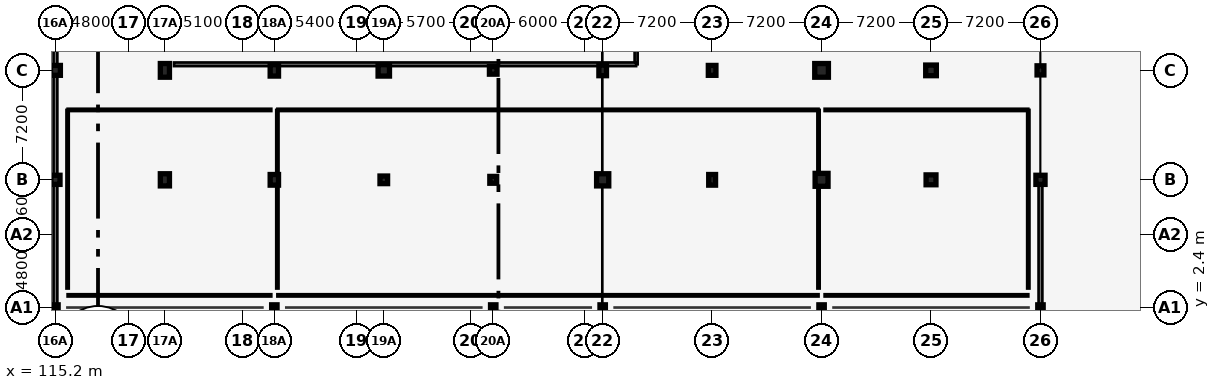
"""IFC4 building model, lengths in metres.
Left out: names, types, materials, properties, quantities, classifications, styles, units other than length and angle.
Written with IfcOpenShell. Run it as: python <this file> out.ifc"""

import sys

from ifc_helpers import new_model, si_unit, direction, frame, frame_2d, origin, origin_2d, place, context, subcontext, project, spatial, rectangle, circle, hollow_circle, extrude, element, fill, save


model = new_model("IFC4")
c1 = context("Model", 3, precision=1e-05, world=origin(), true_north=direction((0.0, 1.0)))
c2 = subcontext(c1, "Body", "Model", "MODEL_VIEW")
j1 = project(units=[si_unit("LENGTHUNIT", "METRE"), si_unit("PLANEANGLEUNIT", "RADIAN")], contexts=[c1])
p1 = place(None, origin())
s1 = spatial("IfcSite", under=j1, at=p1, CompositionType="ELEMENT")
p2 = place(p1, origin())
s2 = spatial("IfcBuilding", under=s1, at=p2, CompositionType="ELEMENT")
p3 = place(p2, frame((0.0, 0.0, 13.2)))
s3 = spatial("IfcBuildingStorey", under=s2, at=p3, CompositionType="ELEMENT", Elevation=13.2)
p4 = place(p3, frame((115.2, 10.8, 0.0), z_axis=(0.0, 0.0, 1.0), x_axis=(1.0, 0.0, 0.0)))
e1 = element("IfcColumn", 1, at=p4, inside=s3, PredefinedType="COLUMN", context=c2, shape_type="SweptSolid", body=[
    extrude(rectangle(XDim=0.6, YDim=0.6, at=origin_2d()), origin(), (0.0, 0.0, 1.0), 4.2),
])
p5 = place(p3, frame((115.2, 18.0, 0.0), z_axis=(0.0, 0.0, 1.0), x_axis=(1.0, 0.0, 0.0)))
e2 = element("IfcColumn", 2, at=p5, inside=s3, PredefinedType="COLUMN", context=c2, shape_type="SweptSolid", body=[
    extrude(rectangle(XDim=0.65, YDim=0.65, at=origin_2d()), origin(), (0.0, 0.0, 1.0), 4.2),
])
p6 = place(p3, frame((122.4, 10.8, 0.0), z_axis=(0.0, 0.0, 1.0), x_axis=(1.0, 0.0, 0.0)))
e3 = element("IfcColumn", 3, at=p6, inside=s3, PredefinedType="COLUMN", context=c2, shape_type="SweptSolid", body=[
    extrude(rectangle(XDim=0.6, YDim=0.8, at=origin_2d()), origin(), (0.0, 0.0, 1.0), 4.2),
])
p7 = place(p3, frame((122.4, 18.0, 0.0), z_axis=(0.0, 0.0, 1.0), x_axis=(1.0, 0.0, 0.0)))
e4 = element("IfcColumn", 4, at=p7, inside=s3, PredefinedType="COLUMN", context=c2, shape_type="SweptSolid", body=[
    extrude(rectangle(XDim=0.6, YDim=0.9, at=origin_2d()), origin(), (0.0, 0.0, 1.0), 4.2),
])
p8 = place(p3, frame((129.6, 10.8, 0.0), z_axis=(0.0, 0.0, 1.0), x_axis=(1.0, 0.0, 0.0)))
e5 = element("IfcColumn", 5, at=p8, inside=s3, PredefinedType="COLUMN", context=c2, shape_type="SweptSolid", body=[
    extrude(rectangle(XDim=0.55, YDim=0.7, at=origin_2d()), origin(), (0.0, 0.0, 1.0), 4.2),
])
p9 = place(p3, frame((129.6, 18.0, 0.0), z_axis=(0.0, 0.0, 1.0), x_axis=(1.0, 0.0, 0.0)))
e6 = element("IfcColumn", 6, at=p9, inside=s3, PredefinedType="COLUMN", context=c2, shape_type="SweptSolid", body=[
    extrude(rectangle(XDim=0.55, YDim=0.75, at=origin_2d()), origin(), (0.0, 0.0, 1.0), 4.2),
])
p10 = place(p3, frame((136.8, 10.8, 0.0), z_axis=(0.0, 0.0, 1.0), x_axis=(1.0, 0.0, 0.0)))
e7 = element("IfcColumn", 7, at=p10, inside=s3, PredefinedType="COLUMN", context=c2, shape_type="SweptSolid", body=[
    extrude(circle(Radius=0.25, at=origin_2d()), origin(), (0.0, 0.0, 1.0), 4.2),
])
p11 = place(p3, frame((136.8, 18.0, 0.0), z_axis=(0.0, 0.0, 1.0), x_axis=(1.0, 0.0, 0.0)))
e8 = element("IfcColumn", 8, at=p11, inside=s3, PredefinedType="COLUMN", context=c2, shape_type="SweptSolid", body=[
    extrude(circle(Radius=0.375, at=origin_2d()), origin(), (0.0, 0.0, 1.0), 4.2),
])
p12 = place(p3, frame((144.0, 10.8, 0.0), z_axis=(0.0, 0.0, 1.0), x_axis=(1.0, 0.0, 0.0)))
e9 = element("IfcColumn", 9, at=p12, inside=s3, PredefinedType="COLUMN", context=c2, shape_type="SweptSolid", body=[
    extrude(rectangle(XDim=0.45, YDim=0.45, at=origin_2d()), origin(), (0.0, 0.0, 1.0), 4.2),
])
p13 = place(p3, frame((144.0, 18.0, 0.0), z_axis=(0.0, 0.0, 1.0), x_axis=(1.0, 0.0, 0.0)))
e10 = element("IfcColumn", 10, at=p13, inside=s3, PredefinedType="COLUMN", context=c2, shape_type="SweptSolid", body=[
    extrude(rectangle(XDim=0.5, YDim=0.5, at=origin_2d()), origin(), (0.0, 0.0, 1.0), 4.2),
])
p14 = place(p3, frame((151.2, 10.8, 0.0), z_axis=(0.0, 0.0, 1.0), x_axis=(1.0, 0.0, 0.0)))
e11 = element("IfcColumn", 11, at=p14, inside=s3, PredefinedType="COLUMN", context=c2, shape_type="SweptSolid", body=[
    extrude(rectangle(XDim=0.8, YDim=0.8, at=origin_2d()), origin(), (0.0, 0.0, 1.0), 4.2),
])
p15 = place(p3, frame((151.2, 18.0, 0.0), z_axis=(0.0, 0.0, 1.0), x_axis=(1.0, 0.0, 0.0)))
e12 = element("IfcColumn", 12, at=p15, inside=s3, PredefinedType="COLUMN", context=c2, shape_type="SweptSolid", body=[
    extrude(rectangle(XDim=0.5, YDim=0.7, at=origin_2d()), origin(), (0.0, 0.0, 1.0), 4.2),
])
p16 = place(p3, frame((158.4, 10.8, 0.0), z_axis=(0.0, 0.0, 1.0), x_axis=(1.0, 0.0, 0.0)))
e13 = element("IfcColumn", 13, at=p16, inside=s3, PredefinedType="COLUMN", context=c2, shape_type="SweptSolid", body=[
    extrude(rectangle(XDim=0.45, YDim=0.7, at=origin_2d()), origin(), (0.0, 0.0, 1.0), 4.2),
])
p17 = place(p3, frame((158.4, 18.0, 0.0), z_axis=(0.0, 0.0, 1.0), x_axis=(1.0, 0.0, 0.0)))
e14 = element("IfcColumn", 14, at=p17, inside=s3, PredefinedType="COLUMN", context=c2, shape_type="SweptSolid", body=[
    extrude(rectangle(XDim=0.5, YDim=0.65, at=origin_2d()), origin(), (0.0, 0.0, 1.0), 4.2),
])
p18 = place(p3, frame((165.6, 10.8, 0.0), z_axis=(0.0, 0.0, 1.0), x_axis=(1.0, 0.0, 0.0)))
e15 = element("IfcColumn", 15, at=p18, inside=s3, PredefinedType="COLUMN", context=c2, shape_type="SweptSolid", body=[
    extrude(rectangle(XDim=0.85, YDim=0.85, at=origin_2d()), origin(), (0.0, 0.0, 1.0), 4.2),
])
p19 = place(p3, frame((165.6, 18.0, 0.0), z_axis=(0.0, 0.0, 1.0), x_axis=(1.0, 0.0, 0.0)))
e16 = element("IfcColumn", 16, at=p19, inside=s3, PredefinedType="COLUMN", context=c2, shape_type="SweptSolid", body=[
    extrude(rectangle(XDim=0.9, YDim=0.9, at=origin_2d()), origin(), (0.0, 0.0, 1.0), 4.2),
])
p20 = place(p3, frame((172.8, 10.8, 0.0), z_axis=(0.0, 0.0, 1.0), x_axis=(1.0, 0.0, 0.0)))
e17 = element("IfcColumn", 17, at=p20, inside=s3, PredefinedType="COLUMN", context=c2, shape_type="SweptSolid", body=[
    extrude(rectangle(XDim=0.65, YDim=0.65, at=origin_2d()), origin(), (0.0, 0.0, 1.0), 4.2),
])
p21 = place(p3, frame((172.8, 18.0, 0.0), z_axis=(0.0, 0.0, 1.0), x_axis=(1.0, 0.0, 0.0)))
e18 = element("IfcColumn", 18, at=p21, inside=s3, PredefinedType="COLUMN", context=c2, shape_type="SweptSolid", body=[
    extrude(rectangle(XDim=0.7, YDim=0.7, at=origin_2d()), origin(), (0.0, 0.0, 1.0), 4.2),
])
p22 = place(p3, frame((180.0, 10.8, 0.0), z_axis=(0.0, 0.0, 1.0), x_axis=(1.0, 0.0, 0.0)))
e19 = element("IfcColumn", 19, at=p22, inside=s3, PredefinedType="COLUMN", context=c2, shape_type="SweptSolid", body=[
    extrude(circle(Radius=0.3, at=origin_2d()), origin(), (0.0, 0.0, 1.0), 4.2),
])
p23 = place(p3, frame((180.0, 18.0, 0.0), z_axis=(0.0, 0.0, 1.0), x_axis=(1.0, 0.0, 0.0)))
e20 = element("IfcColumn", 20, at=p23, inside=s3, PredefinedType="COLUMN", context=c2, shape_type="SweptSolid", body=[
    extrude(rectangle(XDim=0.45, YDim=0.6, at=origin_2d()), origin(), (0.0, 0.0, 1.0), 4.2),
])
for number, where, z_axis, x_axis in (
    (21, (115.2, 2.4, 0.0), (0.0, 0.0, 1.0), (1.0, 0.0, 0.0)),
    (22, (129.6, 2.4, 0.0), (0.0, 0.0, 1.0), (1.0, 0.0, 0.0)),
    (23, (144.0, 2.4, 0.0), (0.0, 0.0, 1.0), (1.0, 0.0, 0.0)),
    (24, (151.2, 2.4, 0.0), (0.0, 0.0, 1.0), (1.0, 0.0, 0.0)),
    (25, (165.6, 2.4, 0.0), (0.0, 0.0, 1.0), (1.0, 0.0, 0.0)),
    (26, (180.0, 2.4, 0.0), (0.0, 0.0, 1.0), (1.0, 0.0, 0.0)),
):
    element("IfcColumn", number, at=place(p3, frame(where, z_axis=z_axis, x_axis=x_axis)), inside=s3, PredefinedType="COLUMN", context=c2, shape_type="SweptSolid", body=[
        extrude(hollow_circle(Radius=0.178, WallThickness=0.013, at=origin_2d()), origin(), (0.0, 0.0, 1.0), 4.2),
    ])
p24 = place(p3, frame((115.2, 32.4, 0.0), z_axis=(0.0, 0.0, 1.0), x_axis=(0.0, -1.0, 0.0)))
e27 = element("IfcWall", 27, at=p24, inside=s3, PredefinedType="SOLIDWALL", context=c2, shape_type="SweptSolid", body=[
    extrude(rectangle(XDim=30.0, YDim=0.25, at=frame_2d((15.0, 0.0))), origin(), (0.0, 0.0, 1.0), 3.253),
])
p25 = place(p24, frame((18.0, 0.0, 0.0)))
e28 = element("IfcOpeningElement", 28, at=p25, cuts=e27, PredefinedType="OPENING", context=c2, shape_type="SweptSolid", body=[
    extrude(rectangle(XDim=1.1, YDim=2.15, at=frame_2d((0.55, 1.075))), frame((0.0, 0.135, 0.0), z_axis=(0.0, -1.0, 0.0), x_axis=(1.0, 0.0, 0.0)), (0.0, 0.0, 1.0), 0.27),
])
p26 = place(p3, frame((180.0, 2.4, 0.0), z_axis=(0.0, 0.0, 1.0), x_axis=(0.0, 1.0, 0.0)))
e29 = element("IfcWall", 29, at=p26, inside=s3, PredefinedType="SOLIDWALL", context=c2, shape_type="SweptSolid", body=[
    extrude(rectangle(XDim=8.4, YDim=0.25, at=frame_2d((4.2, 0.0))), origin(), (0.0, 0.0, 1.0), 3.35),
])
p27 = place(p26, frame((3.5, 0.0, 0.0)))
e30 = element("IfcOpeningElement", 30, at=p27, cuts=e29, PredefinedType="OPENING", context=c2, shape_type="SweptSolid", body=[
    extrude(rectangle(XDim=1.15, YDim=2.15, at=frame_2d((0.575, 1.075))), frame((0.0, 0.135, 0.0), z_axis=(0.0, -1.0, 0.0), x_axis=(1.0, 0.0, 0.0)), (0.0, 0.0, 1.0), 0.27),
])
p28 = place(p3, frame((165.4, 3.2, 0.0), z_axis=(0.0, 0.0, 1.0), x_axis=(-1.0, 0.0, 0.0)))
e31 = element("IfcWall", 31, at=p28, inside=s3, PredefinedType="PARTITIONING", context=c2, shape_type="SweptSolid", body=[
    extrude(rectangle(XDim=35.6, YDim=0.15, at=frame_2d((17.8, 0.0))), origin(), (0.0, 0.0, 1.0), 3.479),
])
p29 = place(p3, frame((165.4, 3.65, 0.0), z_axis=(0.0, 0.0, 1.0), x_axis=(0.0, 1.0, 0.0)))
e32 = element("IfcWall", 32, at=p29, inside=s3, PredefinedType="PARTITIONING", context=c2, shape_type="SweptSolid", body=[
    extrude(rectangle(XDim=11.75, YDim=0.15, at=frame_2d((5.875, 0.0))), origin(), (0.0, 0.0, 1.0), 3.508),
])
p30 = place(p3, frame((129.8, 15.4, 0.0), z_axis=(0.0, 0.0, 1.0), x_axis=(0.0, -1.0, 0.0)))
e33 = element("IfcWall", 33, at=p30, inside=s3, PredefinedType="PARTITIONING", context=c2, shape_type="SweptSolid", body=[
    extrude(rectangle(XDim=11.75, YDim=0.15, at=frame_2d((5.875, 0.0))), origin(), (0.0, 0.0, 1.0), 3.6),
])
p31 = place(p3, frame((129.8, 15.4, 0.0), z_axis=(0.0, 0.0, 1.0), x_axis=(1.0, 0.0, 0.0)))
e34 = element("IfcWall", 34, at=p31, inside=s3, PredefinedType="PARTITIONING", context=c2, shape_type="SweptSolid", body=[
    extrude(rectangle(XDim=35.6, YDim=0.15, at=frame_2d((17.8, 0.0))), origin(), (0.0, 0.0, 1.0), 3.479),
])
p32 = place(p31, frame((16.9, 0.0, 0.0)))
e35 = element("IfcOpeningElement", 35, at=p32, cuts=e34, PredefinedType="OPENING", context=c2, shape_type="SweptSolid", body=[
    extrude(rectangle(XDim=1.8, YDim=2.2, at=frame_2d((0.9, 1.1))), frame((0.0, 0.085, 0.0), z_axis=(0.0, -1.0, 0.0), x_axis=(1.0, 0.0, 0.0)), (0.0, 0.0, 1.0), 0.17),
])
p33 = place(p31, frame((30.6, 0.0, 0.0)))
e36 = element("IfcOpeningElement", 36, at=p33, cuts=e34, PredefinedType="OPENING", context=c2, shape_type="SweptSolid", body=[
    extrude(rectangle(XDim=1.8, YDim=2.2, at=frame_2d((0.9, 1.1))), frame((0.0, 0.085, 0.0), z_axis=(0.0, -1.0, 0.0), x_axis=(1.0, 0.0, 0.0)), (0.0, 0.0, 1.0), 0.17),
])
p34 = place(p3, frame((129.4, 3.2, 0.0), z_axis=(0.0, 0.0, 1.0), x_axis=(-1.0, 0.0, 0.0)))
e37 = element("IfcWall", 37, at=p34, inside=s3, PredefinedType="PARTITIONING", context=c2, shape_type="SweptSolid", body=[
    extrude(rectangle(XDim=13.4, YDim=0.15, at=frame_2d((6.7, 0.0))), origin(), (0.0, 0.0, 1.0), 3.6),
])
p35 = place(p3, frame((116.0, 15.4, 0.0), z_axis=(0.0, 0.0, 1.0), x_axis=(0.0, -1.0, 0.0)))
e38 = element("IfcWall", 38, at=p35, inside=s3, PredefinedType="PARTITIONING", context=c2, shape_type="SweptSolid", body=[
    extrude(rectangle(XDim=11.75, YDim=0.15, at=frame_2d((5.875, 0.0))), origin(), (0.0, 0.0, 1.0), 3.6),
])
p36 = place(p3, frame((116.0, 15.4, 0.0), z_axis=(0.0, 0.0, 1.0), x_axis=(1.0, 0.0, 0.0)))
e39 = element("IfcWall", 39, at=p36, inside=s3, PredefinedType="PARTITIONING", context=c2, shape_type="SweptSolid", body=[
    extrude(rectangle(XDim=13.4, YDim=0.15, at=frame_2d((6.7, 0.0))), origin(), (0.0, 0.0, 1.0), 3.6),
])
p37 = place(p36, frame((6.22, 0.0, 0.0)))
e40 = element("IfcOpeningElement", 40, at=p37, cuts=e39, PredefinedType="OPENING", context=c2, shape_type="SweptSolid", body=[
    extrude(rectangle(XDim=0.96, YDim=2.15, at=frame_2d((0.48, 1.075))), frame((0.0, 0.085, 0.0), z_axis=(0.0, -1.0, 0.0), x_axis=(1.0, 0.0, 0.0)), (0.0, 0.0, 1.0), 0.17),
])
p38 = place(p3, frame((179.2, 3.2, 0.0), z_axis=(0.0, 0.0, 1.0), x_axis=(-1.0, 0.0, 0.0)))
e41 = element("IfcWall", 41, at=p38, inside=s3, PredefinedType="PARTITIONING", context=c2, shape_type="SweptSolid", body=[
    extrude(rectangle(XDim=13.4, YDim=0.15, at=frame_2d((6.7, 0.0))), origin(), (0.0, 0.0, 1.0), 3.6),
])
p39 = place(p3, frame((179.2, 3.65, 0.0), z_axis=(0.0, 0.0, 1.0), x_axis=(0.0, 1.0, 0.0)))
e42 = element("IfcWall", 42, at=p39, inside=s3, PredefinedType="PARTITIONING", context=c2, shape_type="SweptSolid", body=[
    extrude(rectangle(XDim=11.75, YDim=0.15, at=frame_2d((5.875, 0.0))), origin(), (0.0, 0.0, 1.0), 3.6),
])
p40 = place(p3, frame((165.8, 15.4, 0.0), z_axis=(0.0, 0.0, 1.0), x_axis=(1.0, 0.0, 0.0)))
e43 = element("IfcWall", 43, at=p40, inside=s3, PredefinedType="PARTITIONING", context=c2, shape_type="SweptSolid", body=[
    extrude(rectangle(XDim=13.4, YDim=0.15, at=frame_2d((6.7, 0.0))), origin(), (0.0, 0.0, 1.0), 3.6),
])
p41 = place(p40, frame((6.215, 0.0, 0.0)))
e44 = element("IfcOpeningElement", 44, at=p41, cuts=e43, PredefinedType="OPENING", context=c2, shape_type="SweptSolid", body=[
    extrude(rectangle(XDim=0.97, YDim=2.15, at=frame_2d((0.485, 1.075))), frame((0.0, 0.085, 0.0), z_axis=(0.0, -1.0, 0.0), x_axis=(1.0, 0.0, 0.0)), (0.0, 0.0, 1.0), 0.17),
])
p42 = place(p3, frame((153.4, 18.4, 0.0), z_axis=(0.0, 0.0, 1.0), x_axis=(0.0, 1.0, 0.0)))
e45 = element("IfcWall", 45, at=p42, inside=s3, PredefinedType="SOLIDWALL", context=c2, shape_type="SweptSolid", body=[
    extrude(rectangle(XDim=12.95, YDim=0.2, at=frame_2d((6.475, 0.0))), origin(), (0.0, 0.0, 1.0), 3.6),
])
p43 = place(p3, frame((153.4, 18.4, 0.0), z_axis=(0.0, 0.0, 1.0), x_axis=(-1.0, 0.0, 0.0)))
e46 = element("IfcWall", 46, at=p43, inside=s3, PredefinedType="SOLIDWALL", context=c2, shape_type="SweptSolid", body=[
    extrude(rectangle(XDim=30.4, YDim=0.24, at=frame_2d((15.2, 0.0))), origin(), (0.0, 0.0, 1.0), 3.479),
])
p44 = place(p43, frame((20.16, 0.0, 0.0)))
e47 = element("IfcOpeningElement", 47, at=p44, cuts=e46, PredefinedType="OPENING", context=c2, shape_type="SweptSolid", body=[
    extrude(rectangle(XDim=1.6, YDim=2.15, at=frame_2d((0.8, 1.075))), frame((0.0, 0.13, 0.0), z_axis=(0.0, -1.0, 0.0), x_axis=(1.0, 0.0, 0.0)), (0.0, 0.0, 1.0), 0.26),
])
p45 = place(p43, frame((25.6, 0.0, 0.0)))
e48 = element("IfcOpeningElement", 48, at=p45, cuts=e46, PredefinedType="OPENING", context=c2, shape_type="SweptSolid", body=[
    extrude(rectangle(XDim=1.6, YDim=2.15, at=frame_2d((0.8, 1.075))), frame((0.0, 0.13, 0.0), z_axis=(0.0, -1.0, 0.0), x_axis=(1.0, 0.0, 0.0)), (0.0, 0.0, 1.0), 0.26),
])
p46 = place(p25, origin())
e49 = element("IfcDoor", 49, at=p46, inside=s3, OperationType="SINGLE_SWING_LEFT", PredefinedType="DOOR", context=c2, shape_type="SweptSolid", body=[
    extrude(rectangle(XDim=1.1, YDim=2.15, at=frame_2d((0.55, 1.075))), frame((0.0, 0.025, 0.0), z_axis=(0.0, -1.0, 0.0), x_axis=(1.0, 0.0, 0.0)), (0.0, 0.0, 1.0), 0.05),
])
fill(e28, e49)
p47 = place(p27, origin())
e50 = element("IfcDoor", 50, at=p47, inside=s3, OperationType="SINGLE_SWING_RIGHT", PredefinedType="DOOR", context=c2, shape_type="SweptSolid", body=[
    extrude(rectangle(XDim=1.15, YDim=2.15, at=frame_2d((0.575, 1.075))), frame((0.0, 0.025, 0.0), z_axis=(0.0, -1.0, 0.0), x_axis=(1.0, 0.0, 0.0)), (0.0, 0.0, 1.0), 0.05),
])
fill(e30, e50)
p48 = place(p32, origin())
e51 = element("IfcDoor", 51, at=p48, inside=s3, OperationType="DOUBLE_SWING_RIGHT", PredefinedType="DOOR", context=c2, shape_type="SweptSolid", body=[
    extrude(rectangle(XDim=1.8, YDim=2.2, at=frame_2d((0.9, 1.1))), frame((0.0, 0.025, 0.0), z_axis=(0.0, -1.0, 0.0), x_axis=(1.0, 0.0, 0.0)), (0.0, 0.0, 1.0), 0.05),
])
fill(e35, e51)
p49 = place(p33, origin())
e52 = element("IfcDoor", 52, at=p49, inside=s3, OperationType="DOUBLE_SWING_RIGHT", PredefinedType="DOOR", context=c2, shape_type="SweptSolid", body=[
    extrude(rectangle(XDim=1.8, YDim=2.2, at=frame_2d((0.9, 1.1))), frame((0.0, 0.025, 0.0), z_axis=(0.0, -1.0, 0.0), x_axis=(1.0, 0.0, 0.0)), (0.0, 0.0, 1.0), 0.05),
])
fill(e36, e52)
p50 = place(p37, origin())
e53 = element("IfcDoor", 53, at=p50, inside=s3, OperationType="SINGLE_SWING_LEFT", PredefinedType="DOOR", context=c2, shape_type="SweptSolid", body=[
    extrude(rectangle(XDim=0.96, YDim=2.15, at=frame_2d((0.48, 1.075))), frame((0.0, 0.025, 0.0), z_axis=(0.0, -1.0, 0.0), x_axis=(1.0, 0.0, 0.0)), (0.0, 0.0, 1.0), 0.05),
])
fill(e40, e53)
p51 = place(p41, origin())
e54 = element("IfcDoor", 54, at=p51, inside=s3, OperationType="SINGLE_SWING_RIGHT", PredefinedType="DOOR", context=c2, shape_type="SweptSolid", body=[
    extrude(rectangle(XDim=0.97, YDim=2.15, at=frame_2d((0.485, 1.075))), frame((0.0, 0.025, 0.0), z_axis=(0.0, -1.0, 0.0), x_axis=(1.0, 0.0, 0.0)), (0.0, 0.0, 1.0), 0.05),
])
fill(e44, e54)
p52 = place(p44, origin())
e55 = element("IfcDoor", 55, at=p52, inside=s3, OperationType="DOUBLE_SWING_RIGHT", PredefinedType="DOOR", context=c2, shape_type="SweptSolid", body=[
    extrude(rectangle(XDim=1.6, YDim=2.15, at=frame_2d((0.8, 1.075))), frame((0.0, 0.025, 0.0), z_axis=(0.0, -1.0, 0.0), x_axis=(1.0, 0.0, 0.0)), (0.0, 0.0, 1.0), 0.05),
])
fill(e47, e55)
p53 = place(p45, origin())
e56 = element("IfcDoor", 56, at=p53, inside=s3, OperationType="DOUBLE_SWING_RIGHT", PredefinedType="DOOR", context=c2, shape_type="SweptSolid", body=[
    extrude(rectangle(XDim=1.6, YDim=2.15, at=frame_2d((0.8, 1.075))), frame((0.0, 0.025, 0.0), z_axis=(0.0, -1.0, 0.0), x_axis=(1.0, 0.0, 0.0)), (0.0, 0.0, 1.0), 0.05),
])
fill(e48, e56)
save(model, sys.argv[1])
